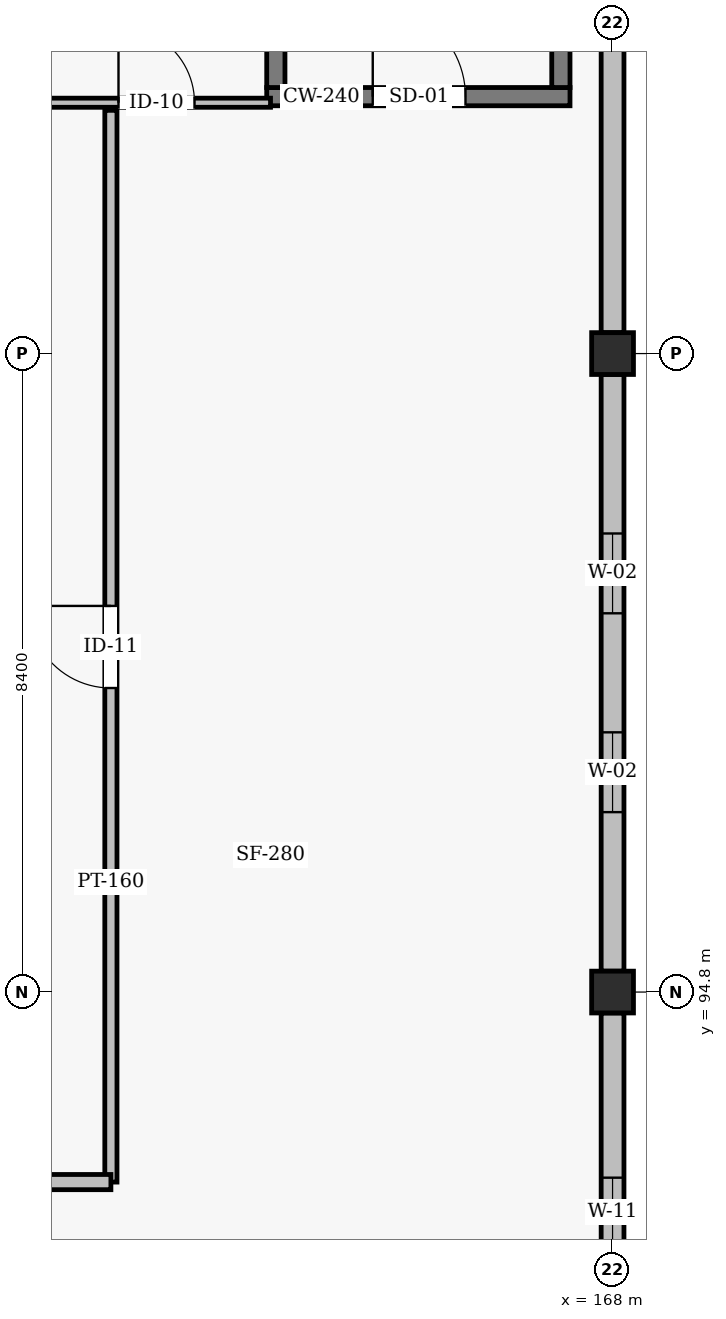
"""IFC4 building model, lengths in metres.
Left out: names, types, materials, properties, quantities, classifications, styles, units other than length and angle.
Written with IfcOpenShell. Run it as: python <this file> out.ifc"""

import sys

from ifc_helpers import new_model, si_unit, direction, frame, frame_2d, origin, origin_2d, place, context, subcontext, project, spatial, rectangle, hollow_rectangle, extrude, element, fill, save


model = new_model("IFC4")
c1 = context("Model", 3, precision=1e-05, world=origin(), true_north=direction((0.0, 1.0)))
c2 = subcontext(c1, "Body", "Model", "MODEL_VIEW")
j1 = project(units=[si_unit("LENGTHUNIT", "METRE"), si_unit("PLANEANGLEUNIT", "RADIAN")], contexts=[c1])
p1 = place(None, origin())
s1 = spatial("IfcSite", under=j1, at=p1, CompositionType="ELEMENT")
p2 = place(p1, origin())
s2 = spatial("IfcBuilding", under=s1, at=p2, CompositionType="ELEMENT")
p3 = place(p2, frame((0.0, 0.0, 17.1)))
s3 = spatial("IfcBuildingStorey", under=s2, at=p3, CompositionType="ELEMENT", Elevation=17.1)
for number, where, z_axis, x_axis in (
    (1, (168.0, 94.8, 0.0), (0.0, 0.0, 1.0), (1.0, 0.0, 0.0)),
    (2, (168.0, 103.2, 0.0), (0.0, 0.0, 1.0), (1.0, 0.0, 0.0)),
):
    element("IfcColumn", number, at=place(p3, frame(where, z_axis=z_axis, x_axis=x_axis)), inside=s3, PredefinedType="COLUMN", context=c2, shape_type="SweptSolid", body=[
        extrude(hollow_rectangle(XDim=0.55, YDim=0.55, WallThickness=0.022, InnerFilletRadius=0.022, OuterFilletRadius=0.044, at=origin_2d()), origin(), (0.0, 0.0, 1.0), 3.9),
    ])
p4 = place(p3, frame((168.0, 86.675, 0.0), z_axis=(0.0, 0.0, 1.0), x_axis=(0.0, 1.0, 0.0)))
e3 = element("IfcWall", 3, at=p4, inside=s3, PredefinedType="SOLIDWALL", context=c2, shape_type="SweptSolid", body=[
    extrude(rectangle(XDim=7.85, YDim=0.3, at=frame_2d((3.925, 0.0))), origin(), (0.0, 0.0, 1.0), 3.1),
])
p5 = place(p4, frame((2.167, 0.0, 1.1)))
e4 = element("IfcOpeningElement", 4, at=p5, cuts=e3, PredefinedType="OPENING", context=c2, shape_type="SweptSolid", body=[
    extrude(rectangle(XDim=0.9, YDim=1.5, at=frame_2d((0.45, 0.75))), frame((0.0, 0.16, 0.0), z_axis=(0.0, -1.0, 0.0), x_axis=(1.0, 0.0, 0.0)), (0.0, 0.0, 1.0), 0.32),
])
p6 = place(p4, frame((4.783, 0.0, 1.1)))
e5 = element("IfcOpeningElement", 5, at=p6, cuts=e3, PredefinedType="OPENING", context=c2, shape_type="SweptSolid", body=[
    extrude(rectangle(XDim=0.9, YDim=1.5, at=frame_2d((0.45, 0.75))), frame((0.0, 0.16, 0.0), z_axis=(0.0, -1.0, 0.0), x_axis=(1.0, 0.0, 0.0)), (0.0, 0.0, 1.0), 0.32),
])
p7 = place(p3, frame((168.0, 95.075, 0.0), z_axis=(0.0, 0.0, 1.0), x_axis=(0.0, 1.0, 0.0)))
e6 = element("IfcWall", 6, at=p7, inside=s3, PredefinedType="SOLIDWALL", context=c2, shape_type="SweptSolid", body=[
    extrude(rectangle(XDim=7.85, YDim=0.3, at=frame_2d((3.925, 0.0))), origin(), (0.0, 0.0, 1.0), 3.1),
])
p8 = place(p7, frame((2.092, 0.0, 0.9)))
e7 = element("IfcOpeningElement", 7, at=p8, cuts=e6, PredefinedType="OPENING", context=c2, shape_type="SweptSolid", body=[
    extrude(rectangle(XDim=1.05, YDim=1.9, at=frame_2d((0.525, 0.95))), frame((0.0, 0.16, 0.0), z_axis=(0.0, -1.0, 0.0), x_axis=(1.0, 0.0, 0.0)), (0.0, 0.0, 1.0), 0.32),
])
p9 = place(p7, frame((4.708, 0.0, 0.9)))
e8 = element("IfcOpeningElement", 8, at=p9, cuts=e6, PredefinedType="OPENING", context=c2, shape_type="SweptSolid", body=[
    extrude(rectangle(XDim=1.05, YDim=1.9, at=frame_2d((0.525, 0.95))), frame((0.0, 0.16, 0.0), z_axis=(0.0, -1.0, 0.0), x_axis=(1.0, 0.0, 0.0)), (0.0, 0.0, 1.0), 0.32),
])
p10 = place(p3, frame((168.0, 103.475, 0.0), z_axis=(0.0, 0.0, 1.0), x_axis=(0.0, 1.0, 0.0)))
e9 = element("IfcWall", 9, at=p10, inside=s3, PredefinedType="SOLIDWALL", context=c2, shape_type="SweptSolid", body=[
    extrude(rectangle(XDim=11.45, YDim=0.3, at=frame_2d((5.725, 0.0))), origin(), (0.0, 0.0, 1.0), 2.808),
])
p11 = place(p3, frame((163.45, 106.58, 0.0), z_axis=(0.0, 0.0, 1.0), x_axis=(1.0, 0.0, 0.0)))
e10 = element("IfcWall", 10, at=p11, inside=s3, PredefinedType="SHEAR", context=c2, shape_type="SweptSolid", body=[
    extrude(rectangle(XDim=3.99, YDim=0.24, at=frame_2d((1.995, 0.0))), origin(), (0.0, 0.0, 1.0), 3.6),
])
p12 = place(p11, frame((1.395, 0.0, 0.0)))
e11 = element("IfcOpeningElement", 11, at=p12, cuts=e10, PredefinedType="OPENING", context=c2, shape_type="SweptSolid", body=[
    extrude(rectangle(XDim=1.22, YDim=2.18, at=frame_2d((0.61, 1.09))), frame((0.0, 0.13, 0.0), z_axis=(0.0, -1.0, 0.0), x_axis=(1.0, 0.0, 0.0)), (0.0, 0.0, 1.0), 0.26),
])
for number, where, z_axis, x_axis in (
    (12, (163.57, 106.7, 0.0), (0.0, 0.0, 1.0), (0.0, 1.0, 0.0)),
    (13, (167.32, 106.7, 0.0), (0.0, 0.0, 1.0), (0.0, 1.0, 0.0)),
):
    element("IfcWall", number, at=place(p3, frame(where, z_axis=z_axis, x_axis=x_axis)), inside=s3, PredefinedType="SHEAR", context=c2, shape_type="SweptSolid", body=[
        extrude(rectangle(XDim=7.9, YDim=0.24, at=frame_2d((3.95, 0.0))), origin(), (0.0, 0.0, 1.0), 3.6),
    ])
p13 = place(p3, frame((160.5, 106.5, 0.0), z_axis=(0.0, 0.0, 1.0), x_axis=(1.0, 0.0, 0.0)))
e14 = element("IfcWall", 14, at=p13, inside=s3, PredefinedType="PARTITIONING", context=c2, shape_type="SweptSolid", body=[
    extrude(rectangle(XDim=3.0, YDim=0.12, at=frame_2d((1.5, 0.0))), origin(), (0.0, 0.0, 1.0), 3.6),
])
p14 = place(p13, frame((1.0, 0.0, 0.0)))
e15 = element("IfcOpeningElement", 15, at=p14, cuts=e14, PredefinedType="OPENING", context=c2, shape_type="SweptSolid", body=[
    extrude(rectangle(XDim=1.0, YDim=2.1, at=frame_2d((0.5, 1.05))), frame((0.0, 0.07, 0.0), z_axis=(0.0, -1.0, 0.0), x_axis=(1.0, 0.0, 0.0)), (0.0, 0.0, 1.0), 0.14),
])
p15 = place(p3, frame((161.4, 92.3, 0.0), z_axis=(0.0, 0.0, 1.0), x_axis=(0.0, 1.0, 0.0)))
e16 = element("IfcWall", 16, at=p15, inside=s3, PredefinedType="PARTITIONING", context=c2, shape_type="SweptSolid", body=[
    extrude(rectangle(XDim=14.1, YDim=0.16, at=frame_2d((7.05, 0.0))), origin(), (0.0, 0.0, 1.0), 2.95),
])
p16 = place(p15, frame((6.5, 0.0, 0.0)))
e17 = element("IfcOpeningElement", 17, at=p16, cuts=e16, PredefinedType="OPENING", context=c2, shape_type="SweptSolid", body=[
    extrude(rectangle(XDim=1.08, YDim=2.08, at=frame_2d((0.54, 1.04))), frame((0.0, 0.09, 0.0), z_axis=(0.0, -1.0, 0.0), x_axis=(1.0, 0.0, 0.0)), (0.0, 0.0, 1.0), 0.18),
])
p17 = place(p3, frame((146.1, 92.3, 0.0), z_axis=(0.0, 0.0, 1.0), x_axis=(1.0, 0.0, 0.0)))
e18 = element("IfcWall", 18, at=p17, inside=s3, PredefinedType="SOLIDWALL", context=c2, shape_type="SweptSolid", body=[
    extrude(rectangle(XDim=15.3, YDim=0.2, at=frame_2d((7.65, 0.0))), origin(), (0.0, 0.0, 1.0), 3.1),
])
p18 = place(p17, frame((7.05, 0.0, 0.0)))
e19 = element("IfcOpeningElement", 19, at=p18, cuts=e18, PredefinedType="OPENING", context=c2, shape_type="SweptSolid", body=[
    extrude(rectangle(XDim=1.24, YDim=2.15, at=frame_2d((0.62, 1.075))), frame((0.0, 0.11, 0.0), z_axis=(0.0, -1.0, 0.0), x_axis=(1.0, 0.0, 0.0)), (0.0, 0.0, 1.0), 0.22),
])
p19 = place(p6, origin())
e20 = element("IfcWindow", 20, at=p19, inside=s3, PartitioningType="SINGLE_PANEL", PredefinedType="WINDOW", context=c2, shape_type="SweptSolid", body=[
    extrude(rectangle(XDim=0.9, YDim=1.5, at=frame_2d((0.45, 0.75))), frame((0.0, 0.03, 0.0), z_axis=(0.0, -1.0, 0.0), x_axis=(1.0, 0.0, 0.0)), (0.0, 0.0, 1.0), 0.06),
])
fill(e5, e20)
p20 = place(p8, origin())
e21 = element("IfcWindow", 21, at=p20, inside=s3, PartitioningType="SINGLE_PANEL", PredefinedType="WINDOW", context=c2, shape_type="SweptSolid", body=[
    extrude(rectangle(XDim=1.05, YDim=1.9, at=frame_2d((0.525, 0.95))), frame((0.0, 0.03, 0.0), z_axis=(0.0, -1.0, 0.0), x_axis=(1.0, 0.0, 0.0)), (0.0, 0.0, 1.0), 0.06),
])
fill(e7, e21)
p21 = place(p9, origin())
e22 = element("IfcWindow", 22, at=p21, inside=s3, PartitioningType="SINGLE_PANEL", PredefinedType="WINDOW", context=c2, shape_type="SweptSolid", body=[
    extrude(rectangle(XDim=1.05, YDim=1.9, at=frame_2d((0.525, 0.95))), frame((0.0, 0.03, 0.0), z_axis=(0.0, -1.0, 0.0), x_axis=(1.0, 0.0, 0.0)), (0.0, 0.0, 1.0), 0.06),
])
fill(e8, e22)
p22 = place(p12, origin())
e23 = element("IfcDoor", 23, at=p22, inside=s3, OperationType="SINGLE_SWING_LEFT", PredefinedType="DOOR", context=c2, shape_type="SweptSolid", body=[
    extrude(rectangle(XDim=1.22, YDim=2.18, at=frame_2d((0.61, 1.09))), frame((0.0, 0.025, 0.0), z_axis=(0.0, -1.0, 0.0), x_axis=(1.0, 0.0, 0.0)), (0.0, 0.0, 1.0), 0.05),
])
fill(e11, e23)
p23 = place(p14, origin())
e24 = element("IfcDoor", 24, at=p23, inside=s3, OperationType="SINGLE_SWING_LEFT", PredefinedType="DOOR", context=c2, shape_type="SweptSolid", body=[
    extrude(rectangle(XDim=1.0, YDim=2.1, at=frame_2d((0.5, 1.05))), frame((0.0, 0.025, 0.0), z_axis=(0.0, -1.0, 0.0), x_axis=(1.0, 0.0, 0.0)), (0.0, 0.0, 1.0), 0.05),
])
fill(e15, e24)
p24 = place(p16, origin())
e25 = element("IfcDoor", 25, at=p24, inside=s3, OperationType="SINGLE_SWING_RIGHT", PredefinedType="DOOR", context=c2, shape_type="SweptSolid", body=[
    extrude(rectangle(XDim=1.08, YDim=2.08, at=frame_2d((0.54, 1.04))), frame((0.0, 0.025, 0.0), z_axis=(0.0, -1.0, 0.0), x_axis=(1.0, 0.0, 0.0)), (0.0, 0.0, 1.0), 0.05),
])
fill(e17, e25)
save(model, sys.argv[1])
